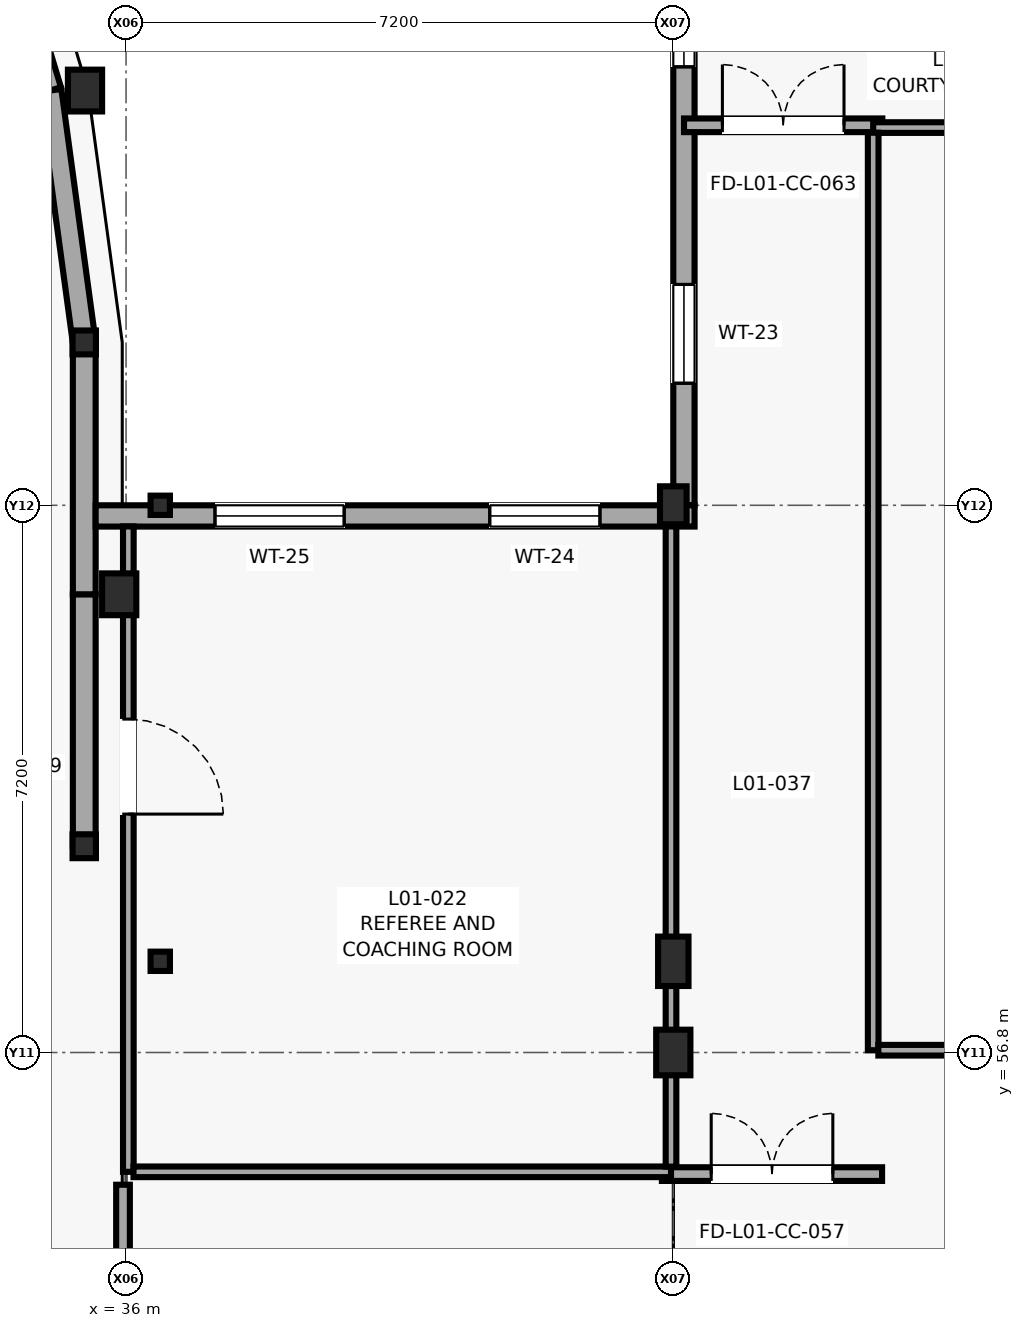
"""IFC4 building model, lengths in metres.
Left out: names, types, materials, properties, quantities, classifications, styles, units other than length and angle.
Written with IfcOpenShell. Run it as: python <this file> out.ifc"""

import sys

from ifc_helpers import new_model, si_unit, direction, frame, frame_2d, origin, origin_2d, place, context, subcontext, project, spatial, rectangle, i_section, extrude, element, fill, save


model = new_model("IFC4")
c1 = context("Model", 3, precision=1e-05, world=origin(), true_north=direction((0.0, 1.0)))
c2 = subcontext(c1, "Body", "Model", "MODEL_VIEW")
j1 = project(units=[si_unit("LENGTHUNIT", "METRE"), si_unit("PLANEANGLEUNIT", "RADIAN")], contexts=[c1])
p1 = place(None, origin())
s1 = spatial("IfcSite", under=j1, at=p1, CompositionType="ELEMENT")
p2 = place(p1, origin())
s2 = spatial("IfcBuilding", under=s1, at=p2, CompositionType="ELEMENT")
p3 = place(p2, frame((0.0, 0.0, 4.2)))
s3 = spatial("IfcBuildingStorey", under=s2, at=p3, CompositionType="ELEMENT", Elevation=4.2)
for number, where, z_axis, x_axis in (
    (1, (35.45, 59.514, 0.0), (0.0, 0.0, 1.0), (1.0, 0.0, 0.0)),
    (2, (35.45, 66.143, 0.0), (0.0, 0.0, 1.0), (1.0, 0.0, 0.0)),
):
    element("IfcColumn", number, at=place(p3, frame(where, z_axis=z_axis, x_axis=x_axis)), inside=s3, PredefinedType="COLUMN", context=c2, shape_type="SweptSolid", body=[
        extrude(i_section(OverallWidth=0.307, OverallDepth=0.314, WebThickness=0.012, FlangeThickness=0.019, FilletRadius=0.015, at=origin_2d()), origin(), (0.0, 0.0, 1.0), 4.0),
    ])
for number, where, z_axis, x_axis in (
    (3, (35.46, 69.457, 0.0), (0.0, 0.0, 1.0), (1.0, 0.0, 0.0)),
    (4, (35.91, 62.829, 0.0), (0.0, 0.0, 1.0), (1.0, 0.0, 0.0)),
):
    element("IfcColumn", number, at=place(p3, frame(where, z_axis=z_axis, x_axis=x_axis)), inside=s3, PredefinedType="PILASTER", context=c2, shape_type="SweptSolid", body=[
        extrude(rectangle(XDim=0.45, YDim=0.55, at=origin_2d()), origin(), (0.0, 0.0, 1.0), 4.0),
    ])
for number, where, z_axis, x_axis in (
    (5, (36.45, 58.0, 0.0), (0.0, 0.0, 1.0), (1.0, 0.0, 0.0)),
    (6, (36.45, 64.0, 0.0), (0.0, 0.0, 1.0), (1.0, 0.0, 0.0)),
):
    element("IfcColumn", number, at=place(p3, frame(where, z_axis=z_axis, x_axis=x_axis)), inside=s3, PredefinedType="COLUMN", context=c2, shape_type="SweptSolid", body=[
        extrude(i_section(OverallWidth=0.255, OverallDepth=0.254, WebThickness=0.009, FlangeThickness=0.014, FilletRadius=0.013, at=origin_2d()), origin(), (0.0, 0.0, 1.0), 4.0),
    ])
p4 = place(p3, frame((43.2, 56.8, 0.0), z_axis=(0.0, 0.0, 1.0), x_axis=(1.0, 0.0, 0.0)))
e7 = element("IfcColumn", 7, at=p4, inside=s3, PredefinedType="COLUMN", context=c2, shape_type="SweptSolid", body=[
    extrude(rectangle(XDim=0.45, YDim=0.6, at=origin_2d()), origin(), (0.0, 0.0, 1.0), 4.0),
])
p5 = place(p3, frame((43.2, 58.0, 0.0), z_axis=(0.0, 0.0, 1.0), x_axis=(1.0, 0.0, 0.0)))
e8 = element("IfcColumn", 8, at=p5, inside=s3, PredefinedType="COLUMN", context=c2, shape_type="SweptSolid", body=[
    extrude(rectangle(XDim=0.4, YDim=0.65, at=origin_2d()), origin(), (0.0, 0.0, 1.0), 4.0),
])
p6 = place(p3, frame((43.2, 64.0, 0.0), z_axis=(0.0, 0.0, 1.0), x_axis=(1.0, 0.0, 0.0)))
e9 = element("IfcColumn", 9, at=p6, inside=s3, PredefinedType="PILASTER", context=c2, shape_type="SweptSolid", body=[
    extrude(rectangle(XDim=0.35, YDim=0.5, at=origin_2d()), origin(), (0.0, 0.0, 1.0), 4.0),
])
p7 = place(p3, frame((35.45, 59.514, 0.0), z_axis=(0.0, 0.0, 1.0), x_axis=(0.0, 1.0, 0.0)))
e10 = element("IfcWall", 10, at=p7, inside=s3, PredefinedType="SOLIDWALL", context=c2, shape_type="SweptSolid", body=[
    extrude(rectangle(XDim=3.315, YDim=0.3, at=frame_2d((1.658, 0.0))), origin(), (0.0, 0.0, 1.0), 3.48),
])
p8 = place(p3, frame((35.45, 62.829, 0.0), z_axis=(0.0, 0.0, 1.0), x_axis=(0.0, 1.0, 0.0)))
e11 = element("IfcWall", 11, at=p8, inside=s3, PredefinedType="SOLIDWALL", context=c2, shape_type="SweptSolid", body=[
    extrude(rectangle(XDim=3.314, YDim=0.3, at=frame_2d((1.657, 0.0))), origin(), (0.0, 0.0, 1.0), 3.48),
])
p9 = place(p3, frame((35.45, 66.143, 0.0), z_axis=(0.0, 0.0, 1.0), x_axis=(-0.134539839792, 0.990908185206, 0.0)))
e12 = element("IfcWall", 12, at=p9, inside=s3, PredefinedType="SOLIDWALL", context=c2, shape_type="SweptSolid", body=[
    extrude(rectangle(XDim=3.344, YDim=0.3, at=frame_2d((1.672, 0.0))), origin(), (0.0, 0.0, 1.0), 3.735),
])
p10 = place(p3, frame((35.0, 69.457, 0.0), z_axis=(0.0, 0.0, 1.0), x_axis=(-0.288887509039, 0.957363048755, 0.0)))
e13 = element("IfcWall", 13, at=p10, inside=s3, PredefinedType="SOLIDWALL", context=c2, shape_type="SweptSolid", body=[
    extrude(rectangle(XDim=3.462, YDim=0.3, at=frame_2d((1.731, 0.0))), origin(), (0.0, 0.0, 1.0), 3.745),
])
p11 = place(p3, frame((43.34, 77.538, 0.0), z_axis=(0.0, 0.0, 1.0), x_axis=(0.0, -1.0, 0.0)))
e14 = element("IfcWall", 14, at=p11, inside=s3, PredefinedType="SOLIDWALL", context=c2, shape_type="SweptSolid", body=[
    extrude(rectangle(XDim=13.538, YDim=0.28, at=frame_2d((6.769, 0.0))), origin(), (0.0, 0.0, 1.0), 3.225),
])
p12 = place(p11, frame((1.806, 0.0, 1.05)))
e15 = element("IfcOpeningElement", 15, at=p12, cuts=e14, PredefinedType="OPENING", context=c2, shape_type="SweptSolid", body=[
    extrude(rectangle(XDim=0.9, YDim=1.5, at=frame_2d((0.45, 0.75))), frame((0.0, 0.15, 0.0), z_axis=(0.0, -1.0, 0.0), x_axis=(1.0, 0.0, 0.0)), (0.0, 0.0, 1.0), 0.3),
])
p13 = place(p11, frame((6.669, 0.0, 0.75)))
e16 = element("IfcOpeningElement", 16, at=p13, cuts=e14, PredefinedType="OPENING", context=c2, shape_type="SweptSolid", body=[
    extrude(rectangle(XDim=1.1, YDim=2.1, at=frame_2d((0.55, 1.05))), frame((0.0, 0.15, 0.0), z_axis=(0.0, -1.0, 0.0), x_axis=(1.0, 0.0, 0.0)), (0.0, 0.0, 1.0), 0.3),
])
p14 = place(p11, frame((10.632, 0.0, 1.05)))
e17 = element("IfcOpeningElement", 17, at=p14, cuts=e14, PredefinedType="OPENING", context=c2, shape_type="SweptSolid", body=[
    extrude(rectangle(XDim=1.3, YDim=1.6, at=frame_2d((0.65, 0.8))), frame((0.0, 0.15, 0.0), z_axis=(0.0, -1.0, 0.0), x_axis=(1.0, 0.0, 0.0)), (0.0, 0.0, 1.0), 0.3),
])
p15 = place(p3, frame((43.48, 63.86, 0.0), z_axis=(0.0, 0.0, 1.0), x_axis=(-1.0, 0.0, 0.0)))
e18 = element("IfcWall", 18, at=p15, inside=s3, PredefinedType="SOLIDWALL", context=c2, shape_type="SweptSolid", body=[
    extrude(rectangle(XDim=7.88, YDim=0.28, at=frame_2d((3.94, 0.0))), origin(), (0.0, 0.0, 1.0), 2.86),
])
p16 = place(p15, frame((1.245, 0.0, 0.85)))
e19 = element("IfcOpeningElement", 19, at=p16, cuts=e18, PredefinedType="OPENING", context=c2, shape_type="SweptSolid", body=[
    extrude(rectangle(XDim=1.45, YDim=1.7, at=frame_2d((0.725, 0.85))), frame((0.0, 0.15, 0.0), z_axis=(0.0, -1.0, 0.0), x_axis=(1.0, 0.0, 0.0)), (0.0, 0.0, 1.0), 0.3),
])
p17 = place(p15, frame((4.61, 0.0, 0.85)))
e20 = element("IfcOpeningElement", 20, at=p17, cuts=e18, PredefinedType="OPENING", context=c2, shape_type="SweptSolid", body=[
    extrude(rectangle(XDim=1.7, YDim=1.75, at=frame_2d((0.85, 0.875))), frame((0.0, 0.15, 0.0), z_axis=(0.0, -1.0, 0.0), x_axis=(1.0, 0.0, 0.0)), (0.0, 0.0, 1.0), 0.3),
])
p18 = place(p3, frame((35.96, 50.678, 0.0), z_axis=(0.0, 0.0, 1.0), x_axis=(0.0, 1.0, 0.0)))
e21 = element("IfcWall", 21, at=p18, inside=s3, PredefinedType="PARTITIONING", context=c2, shape_type="SweptSolid", body=[
    extrude(rectangle(XDim=4.382, YDim=0.18, at=frame_2d((2.191, 0.0))), origin(), (0.0, 0.0, 1.0), 3.78),
])
p19 = place(p18, frame((0.9, 0.0, 0.0)))
e22 = element("IfcOpeningElement", 22, at=p19, cuts=e21, PredefinedType="OPENING", context=c2, shape_type="SweptSolid", body=[
    extrude(rectangle(XDim=1.6, YDim=2.25, at=frame_2d((0.8, 1.125))), frame((0.0, 0.1, 0.0), z_axis=(0.0, -1.0, 0.0), x_axis=(1.0, 0.0, 0.0)), (0.0, 0.0, 1.0), 0.2),
])
p20 = place(p3, frame((43.05, 55.2, 0.0), z_axis=(0.0, 0.0, 1.0), x_axis=(1.0, 0.0, 0.0)))
e23 = element("IfcWall", 23, at=p20, inside=s3, PredefinedType="PARTITIONING", context=c2, shape_type="SweptSolid", body=[
    extrude(rectangle(XDim=2.897, YDim=0.18, at=frame_2d((1.448, 0.0))), origin(), (0.0, 0.0, 1.0), 3.78),
])
p21 = place(p20, frame((0.649, 0.0, 0.0)))
e24 = element("IfcOpeningElement", 24, at=p21, cuts=e23, PredefinedType="OPENING", context=c2, shape_type="SweptSolid", body=[
    extrude(rectangle(XDim=1.6, YDim=2.25, at=frame_2d((0.8, 1.125))), frame((0.0, 0.1, 0.0), z_axis=(0.0, -1.0, 0.0), x_axis=(1.0, 0.0, 0.0)), (0.0, 0.0, 1.0), 0.2),
])
p22 = place(p3, frame((43.341, 69.0, 0.0), z_axis=(0.0, 0.0, 1.0), x_axis=(1.0, 0.0, 0.0)))
e25 = element("IfcWall", 25, at=p22, inside=s3, PredefinedType="PARTITIONING", context=c2, shape_type="SweptSolid", body=[
    extrude(rectangle(XDim=2.609, YDim=0.18, at=frame_2d((1.304, 0.0))), origin(), (0.0, 0.0, 1.0), 3.78),
])
p23 = place(p22, frame((0.505, 0.0, 0.0)))
e26 = element("IfcOpeningElement", 26, at=p23, cuts=e25, PredefinedType="OPENING", context=c2, shape_type="SweptSolid", body=[
    extrude(rectangle(XDim=1.6, YDim=2.25, at=frame_2d((0.8, 1.125))), frame((0.0, 0.1, 0.0), z_axis=(0.0, -1.0, 0.0), x_axis=(1.0, 0.0, 0.0)), (0.0, 0.0, 1.0), 0.2),
])
p24 = place(p3, frame((36.03, 63.722, 0.0), z_axis=(0.0, 0.0, 1.0), x_axis=(0.0, -1.0, 0.0)))
e27 = element("IfcWall", 27, at=p24, inside=s3, PredefinedType="PARTITIONING", context=c2, shape_type="SweptSolid", body=[
    extrude(rectangle(XDim=8.492, YDim=0.14, at=frame_2d((4.246, 0.0))), origin(), (0.0, 0.0, 1.0), 3.76),
])
p25 = place(p24, frame((2.535, 0.0, 0.0)))
e28 = element("IfcOpeningElement", 28, at=p25, cuts=e27, PredefinedType="OPENING", context=c2, shape_type="SweptSolid", body=[
    extrude(rectangle(XDim=1.25, YDim=2.22, at=frame_2d((0.625, 1.11))), frame((0.0, 0.08, 0.0), z_axis=(0.0, -1.0, 0.0), x_axis=(1.0, 0.0, 0.0)), (0.0, 0.0, 1.0), 0.16),
])
p26 = place(p3, frame((36.098, 55.23, 0.0), z_axis=(0.0, 0.0, 1.0), x_axis=(1.0, 0.0, 0.0)))
e29 = element("IfcWall", 29, at=p26, inside=s3, PredefinedType="PARTITIONING", context=c2, shape_type="SweptSolid", body=[
    extrude(rectangle(XDim=7.072, YDim=0.14, at=frame_2d((3.536, 0.0))), origin(), (0.0, 0.0, 1.0), 3.76),
])
p27 = place(p3, frame((43.17, 55.298, 0.0), z_axis=(0.0, 0.0, 1.0), x_axis=(0.0, 1.0, 0.0)))
e30 = element("IfcWall", 30, at=p27, inside=s3, PredefinedType="PARTITIONING", context=c2, shape_type="SweptSolid", body=[
    extrude(rectangle(XDim=8.424, YDim=0.14, at=frame_2d((4.212, 0.0))), origin(), (0.0, 0.0, 1.0), 3.175),
])
p28 = place(p3, frame((63.37, 68.97, 0.0), z_axis=(0.0, 0.0, 1.0), x_axis=(-1.0, 0.0, 0.0)))
e31 = element("IfcWall", 31, at=p28, inside=s3, PredefinedType="PARTITIONING", context=c2, shape_type="SweptSolid", body=[
    extrude(rectangle(XDim=17.54, YDim=0.14, at=frame_2d((8.77, 0.0))), origin(), (0.0, 0.0, 1.0), 3.775),
])
p29 = place(p28, frame((8.26, 0.0, 0.0)))
e32 = element("IfcOpeningElement", 32, at=p29, cuts=e31, PredefinedType="OPENING", context=c2, shape_type="SweptSolid", body=[
    extrude(rectangle(XDim=1.02, YDim=2.14, at=frame_2d((0.51, 1.07))), frame((0.0, 0.08, 0.0), z_axis=(0.0, -1.0, 0.0), x_axis=(1.0, 0.0, 0.0)), (0.0, 0.0, 1.0), 0.16),
])
p30 = place(p28, frame((9.98, 0.0, 1.05)))
e33 = element("IfcOpeningElement", 33, at=p30, cuts=e31, PredefinedType="OPENING", context=c2, shape_type="SweptSolid", body=[
    extrude(rectangle(XDim=1.4, YDim=1.05, at=frame_2d((0.7, 0.525))), frame((0.0, 0.08, 0.0), z_axis=(0.0, -1.0, 0.0), x_axis=(1.0, 0.0, 0.0)), (0.0, 0.0, 1.0), 0.16),
])
p31 = place(p3, frame((45.83, 68.902, 0.0), z_axis=(0.0, 0.0, 1.0), x_axis=(0.0, -1.0, 0.0)))
e34 = element("IfcWall", 34, at=p31, inside=s3, PredefinedType="PARTITIONING", context=c2, shape_type="SweptSolid", body=[
    extrude(rectangle(XDim=12.072, YDim=0.14, at=frame_2d((6.036, 0.0))), origin(), (0.0, 0.0, 1.0), 3.775),
])
p32 = place(p3, frame((45.898, 56.83, 0.0), z_axis=(0.0, 0.0, 1.0), x_axis=(1.0, 0.0, 0.0)))
e35 = element("IfcWall", 35, at=p32, inside=s3, PredefinedType="PARTITIONING", context=c2, shape_type="SweptSolid", body=[
    extrude(rectangle(XDim=5.532, YDim=0.14, at=frame_2d((2.766, 0.0))), origin(), (0.0, 0.0, 1.0), 2.925),
])
p33 = place(p13, origin())
e36 = element("IfcWindow", 36, at=p33, inside=s3, PartitioningType="SINGLE_PANEL", PredefinedType="WINDOW", context=c2, shape_type="SweptSolid", body=[
    extrude(rectangle(XDim=1.1, YDim=2.1, at=frame_2d((0.55, 1.05))), frame((0.0, 0.03, 0.0), z_axis=(0.0, -1.0, 0.0), x_axis=(1.0, 0.0, 0.0)), (0.0, 0.0, 1.0), 0.06),
])
fill(e16, e36)
p34 = place(p14, origin())
e37 = element("IfcWindow", 37, at=p34, inside=s3, PartitioningType="SINGLE_PANEL", PredefinedType="WINDOW", context=c2, shape_type="SweptSolid", body=[
    extrude(rectangle(XDim=1.3, YDim=1.6, at=frame_2d((0.65, 0.8))), frame((0.0, 0.03, 0.0), z_axis=(0.0, -1.0, 0.0), x_axis=(1.0, 0.0, 0.0)), (0.0, 0.0, 1.0), 0.06),
])
fill(e17, e37)
p35 = place(p16, origin())
e38 = element("IfcWindow", 38, at=p35, inside=s3, PartitioningType="SINGLE_PANEL", PredefinedType="WINDOW", context=c2, shape_type="SweptSolid", body=[
    extrude(rectangle(XDim=1.45, YDim=1.7, at=frame_2d((0.725, 0.85))), frame((0.0, 0.03, 0.0), z_axis=(0.0, -1.0, 0.0), x_axis=(1.0, 0.0, 0.0)), (0.0, 0.0, 1.0), 0.06),
])
fill(e19, e38)
p36 = place(p17, origin())
e39 = element("IfcWindow", 39, at=p36, inside=s3, PartitioningType="SINGLE_PANEL", PredefinedType="WINDOW", context=c2, shape_type="SweptSolid", body=[
    extrude(rectangle(XDim=1.7, YDim=1.75, at=frame_2d((0.85, 0.875))), frame((0.0, 0.03, 0.0), z_axis=(0.0, -1.0, 0.0), x_axis=(1.0, 0.0, 0.0)), (0.0, 0.0, 1.0), 0.06),
])
fill(e20, e39)
p37 = place(p21, origin())
e40 = element("IfcDoor", 40, at=p37, inside=s3, OperationType="DOUBLE_DOOR_SINGLE_SWING", PredefinedType="DOOR", context=c2, shape_type="SweptSolid", body=[
    extrude(rectangle(XDim=1.6, YDim=2.25, at=frame_2d((0.8, 1.125))), frame((0.0, 0.025, 0.0), z_axis=(0.0, -1.0, 0.0), x_axis=(1.0, 0.0, 0.0)), (0.0, 0.0, 1.0), 0.05),
])
fill(e24, e40)
p38 = place(p23, origin())
e41 = element("IfcDoor", 41, at=p38, inside=s3, OperationType="DOUBLE_DOOR_SINGLE_SWING", PredefinedType="DOOR", context=c2, shape_type="SweptSolid", body=[
    extrude(rectangle(XDim=1.6, YDim=2.25, at=frame_2d((0.8, 1.125))), frame((0.0, 0.025, 0.0), z_axis=(0.0, -1.0, 0.0), x_axis=(1.0, 0.0, 0.0)), (0.0, 0.0, 1.0), 0.05),
])
fill(e26, e41)
p39 = place(p25, origin())
e42 = element("IfcDoor", 42, at=p39, inside=s3, OperationType="SINGLE_SWING_RIGHT", PredefinedType="DOOR", context=c2, shape_type="SweptSolid", body=[
    extrude(rectangle(XDim=1.25, YDim=2.22, at=frame_2d((0.625, 1.11))), frame((0.0, 0.025, 0.0), z_axis=(0.0, -1.0, 0.0), x_axis=(1.0, 0.0, 0.0)), (0.0, 0.0, 1.0), 0.05),
])
fill(e28, e42)
save(model, sys.argv[1])
